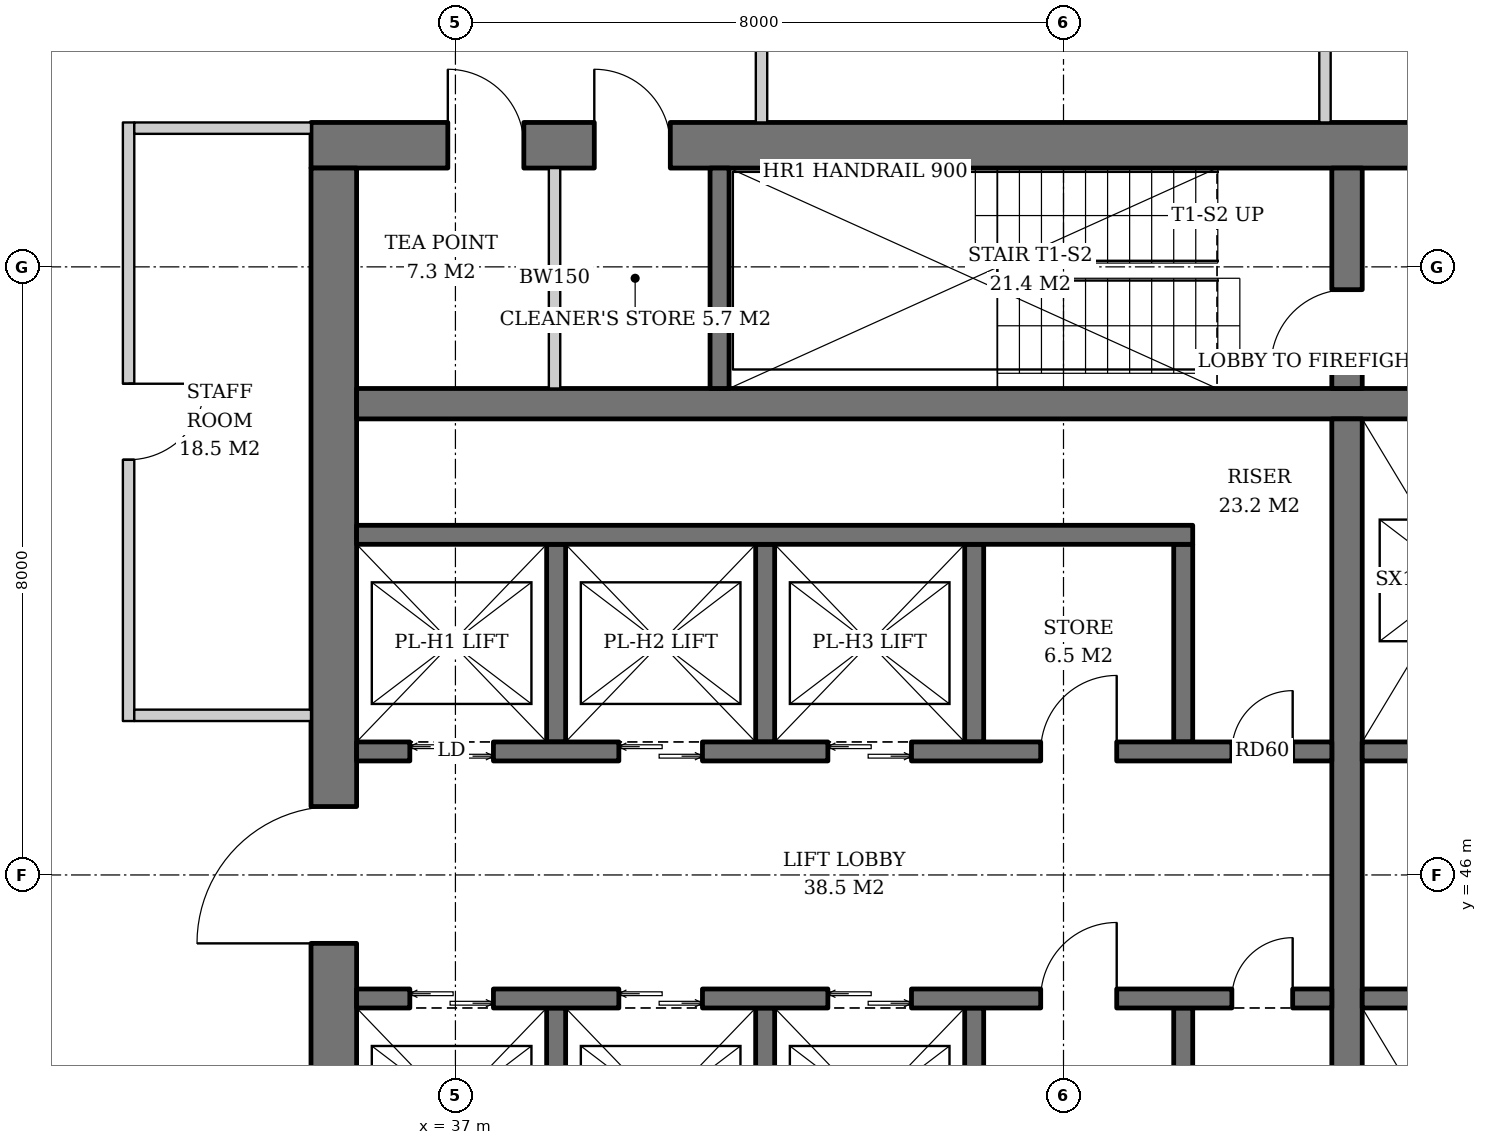
"""IFC4 building model, lengths in metres.
Left out: names, types, materials, properties, quantities, classifications, styles, units other than length and angle.
Written with IfcOpenShell. Run it as: python <this file> out.ifc"""

import sys

from ifc_helpers import new_model, si_unit, direction, frame, frame_2d, origin, place, context, subcontext, project, spatial, rectangle, extrude, element, fill, save


model = new_model("IFC4")
c1 = context("Model", 3, precision=1e-05, world=origin(), true_north=direction((0.0, 1.0)))
c2 = subcontext(c1, "Body", "Model", "MODEL_VIEW")
j1 = project(units=[si_unit("LENGTHUNIT", "METRE"), si_unit("PLANEANGLEUNIT", "RADIAN")], contexts=[c1])
p1 = place(None, origin())
s1 = spatial("IfcSite", under=j1, at=p1, CompositionType="ELEMENT")
p2 = place(p1, origin())
s2 = spatial("IfcBuilding", under=s1, at=p2, CompositionType="ELEMENT")
p3 = place(p2, frame((0.0, 0.0, 199.6)))
s3 = spatial("IfcBuildingStorey", under=s2, at=p3, CompositionType="ELEMENT", Elevation=199.6)
p4 = place(p3, frame((35.1, 55.6, 0.0), z_axis=(0.0, 0.0, 1.0), x_axis=(1.0, 0.0, 0.0)))
e1 = element("IfcWall", 1, at=p4, inside=s3, PredefinedType="SHEAR", context=c2, shape_type="SweptSolid", body=[
    extrude(rectangle(XDim=19.8, YDim=0.6, at=frame_2d((9.9, 0.0))), origin(), (0.0, 0.0, 1.0), 3.8),
])
p5 = place(p4, frame((14.54, 0.0, 0.0)))
e2 = element("IfcOpeningElement", 2, at=p5, cuts=e1, PredefinedType="OPENING", context=c2, shape_type="SweptSolid", body=[
    extrude(rectangle(XDim=1.0, YDim=2.1, at=frame_2d((0.5, 1.05))), frame((0.0, 0.31, 0.0), z_axis=(0.0, -1.0, 0.0), x_axis=(1.0, 0.0, 0.0)), (0.0, 0.0, 1.0), 0.62),
])
p6 = place(p4, frame((1.8, 0.0, 0.0)))
e3 = element("IfcOpeningElement", 3, at=p6, cuts=e1, PredefinedType="OPENING", context=c2, shape_type="SweptSolid", body=[
    extrude(rectangle(XDim=1.0, YDim=2.1, at=frame_2d((0.5, 1.05))), frame((0.0, 0.31, 0.0), z_axis=(0.0, -1.0, 0.0), x_axis=(1.0, 0.0, 0.0)), (0.0, 0.0, 1.0), 0.62),
])
p7 = place(p4, frame((3.727, 0.0, 0.0)))
e4 = element("IfcOpeningElement", 4, at=p7, cuts=e1, PredefinedType="OPENING", context=c2, shape_type="SweptSolid", body=[
    extrude(rectangle(XDim=1.0, YDim=2.1, at=frame_2d((0.5, 1.05))), frame((0.0, 0.31, 0.0), z_axis=(0.0, -1.0, 0.0), x_axis=(1.0, 0.0, 0.0)), (0.0, 0.0, 1.0), 0.62),
])
p8 = place(p3, frame((35.4, 36.7, 0.0), z_axis=(0.0, 0.0, 1.0), x_axis=(0.0, 1.0, 0.0)))
e5 = element("IfcWall", 5, at=p8, inside=s3, PredefinedType="SHEAR", context=c2, shape_type="SweptSolid", body=[
    extrude(rectangle(XDim=18.6, YDim=0.6, at=frame_2d((9.3, 0.0))), origin(), (0.0, 0.0, 1.0), 3.8),
])
p9 = place(p8, frame((8.4, 0.0, 0.0)))
e6 = element("IfcOpeningElement", 6, at=p9, cuts=e5, PredefinedType="OPENING", context=c2, shape_type="SweptSolid", body=[
    extrude(rectangle(XDim=1.8, YDim=2.4, at=frame_2d((0.9, 1.2))), frame((0.0, 0.31, 0.0), z_axis=(0.0, -1.0, 0.0), x_axis=(1.0, 0.0, 0.0)), (0.0, 0.0, 1.0), 0.62),
])
p10 = place(p3, frame((35.7, 52.2, 0.0), z_axis=(0.0, 0.0, 1.0), x_axis=(1.0, 0.0, 0.0)))
e7 = element("IfcWall", 7, at=p10, inside=s3, PredefinedType="SHEAR", context=c2, shape_type="SweptSolid", body=[
    extrude(rectangle(XDim=18.6, YDim=0.4, at=frame_2d((9.3, 0.0))), origin(), (0.0, 0.0, 1.0), 3.8),
])
p11 = place(p3, frame((48.73, 40.0, 0.0), z_axis=(0.0, 0.0, 1.0), x_axis=(0.0, 1.0, 0.0)))
e8 = element("IfcWall", 8, at=p11, inside=s3, PredefinedType="SHEAR", context=c2, shape_type="SweptSolid", body=[
    extrude(rectangle(XDim=12.0, YDim=0.4, at=frame_2d((6.0, 0.0))), origin(), (0.0, 0.0, 1.0), 3.8),
])
p12 = place(p3, frame((48.73, 52.4, 0.0), z_axis=(0.0, 0.0, 1.0), x_axis=(0.0, 1.0, 0.0)))
e9 = element("IfcWall", 9, at=p12, inside=s3, PredefinedType="SHEAR", context=c2, shape_type="SweptSolid", body=[
    extrude(rectangle(XDim=2.9, YDim=0.4, at=frame_2d((1.45, 0.0))), origin(), (0.0, 0.0, 1.0), 3.8),
])
p13 = place(p12, frame((0.3, 0.0, 0.0)))
e10 = element("IfcOpeningElement", 10, at=p13, cuts=e9, PredefinedType="OPENING", context=c2, shape_type="SweptSolid", body=[
    extrude(rectangle(XDim=1.0, YDim=2.1, at=frame_2d((0.5, 1.05))), frame((0.0, 0.21, 0.0), z_axis=(0.0, -1.0, 0.0), x_axis=(1.0, 0.0, 0.0)), (0.0, 0.0, 1.0), 0.42),
])
p14 = place(p3, frame((40.475, 52.4, 0.0), z_axis=(0.0, 0.0, 1.0), x_axis=(0.0, 1.0, 0.0)))
e11 = element("IfcWall", 11, at=p14, inside=s3, PredefinedType="SHEAR", context=c2, shape_type="SweptSolid", body=[
    extrude(rectangle(XDim=2.9, YDim=0.25, at=frame_2d((1.45, 0.0))), origin(), (0.0, 0.0, 1.0), 3.8),
])
for number, where, z_axis, x_axis in (
    (12, (38.325, 47.75, 0.0), (0.0, 0.0, 1.0), (0.0, 1.0, 0.0)),
    (13, (41.075, 47.75, 0.0), (0.0, 0.0, 1.0), (0.0, 1.0, 0.0)),
    (14, (43.825, 47.75, 0.0), (0.0, 0.0, 1.0), (0.0, 1.0, 0.0)),
    (15, (46.575, 47.75, 0.0), (0.0, 0.0, 1.0), (0.0, 1.0, 0.0)),
):
    element("IfcWall", number, at=place(p3, frame(where, z_axis=z_axis, x_axis=x_axis)), inside=s3, PredefinedType="SHEAR", context=c2, shape_type="SweptSolid", body=[
        extrude(rectangle(XDim=2.6, YDim=0.25, at=frame_2d((1.3, 0.0))), origin(), (0.0, 0.0, 1.0), 3.8),
    ])
p15 = place(p3, frame((35.7, 50.475, 0.0), z_axis=(0.0, 0.0, 1.0), x_axis=(1.0, 0.0, 0.0)))
e16 = element("IfcWall", 16, at=p15, inside=s3, PredefinedType="SHEAR", context=c2, shape_type="SweptSolid", body=[
    extrude(rectangle(XDim=11.0, YDim=0.25, at=frame_2d((5.5, 0.0))), origin(), (0.0, 0.0, 1.0), 3.8),
])
p16 = place(p3, frame((35.7, 47.625, 0.0), z_axis=(0.0, 0.0, 1.0), x_axis=(1.0, 0.0, 0.0)))
e17 = element("IfcWall", 17, at=p16, inside=s3, PredefinedType="SHEAR", context=c2, shape_type="SweptSolid", body=[
    extrude(rectangle(XDim=12.83, YDim=0.25, at=frame_2d((6.415, 0.0))), origin(), (0.0, 0.0, 1.0), 3.8),
])
p17 = place(p16, frame((0.7, 0.0, 0.0)))
e18 = element("IfcOpeningElement", 18, at=p17, cuts=e17, PredefinedType="OPENING", context=c2, shape_type="SweptSolid", body=[
    extrude(rectangle(XDim=1.1, YDim=2.2, at=frame_2d((0.55, 1.1))), frame((0.0, 0.135, 0.0), z_axis=(0.0, -1.0, 0.0), x_axis=(1.0, 0.0, 0.0)), (0.0, 0.0, 1.0), 0.27),
])
p18 = place(p16, frame((3.45, 0.0, 0.0)))
e19 = element("IfcOpeningElement", 19, at=p18, cuts=e17, PredefinedType="OPENING", context=c2, shape_type="SweptSolid", body=[
    extrude(rectangle(XDim=1.1, YDim=2.2, at=frame_2d((0.55, 1.1))), frame((0.0, 0.135, 0.0), z_axis=(0.0, -1.0, 0.0), x_axis=(1.0, 0.0, 0.0)), (0.0, 0.0, 1.0), 0.27),
])
p19 = place(p16, frame((6.2, 0.0, 0.0)))
e20 = element("IfcOpeningElement", 20, at=p19, cuts=e17, PredefinedType="OPENING", context=c2, shape_type="SweptSolid", body=[
    extrude(rectangle(XDim=1.1, YDim=2.2, at=frame_2d((0.55, 1.1))), frame((0.0, 0.135, 0.0), z_axis=(0.0, -1.0, 0.0), x_axis=(1.0, 0.0, 0.0)), (0.0, 0.0, 1.0), 0.27),
])
p20 = place(p16, frame((9.0, 0.0, 0.0)))
e21 = element("IfcOpeningElement", 21, at=p20, cuts=e17, PredefinedType="OPENING", context=c2, shape_type="SweptSolid", body=[
    extrude(rectangle(XDim=1.0, YDim=2.1, at=frame_2d((0.5, 1.05))), frame((0.0, 0.135, 0.0), z_axis=(0.0, -1.0, 0.0), x_axis=(1.0, 0.0, 0.0)), (0.0, 0.0, 1.0), 0.27),
])
p21 = place(p16, frame((11.515, 0.0, 0.0)))
e22 = element("IfcOpeningElement", 22, at=p21, cuts=e17, PredefinedType="OPENING", context=c2, shape_type="SweptSolid", body=[
    extrude(rectangle(XDim=0.8, YDim=2.0, at=frame_2d((0.4, 1.0))), frame((0.0, 0.135, 0.0), z_axis=(0.0, -1.0, 0.0), x_axis=(1.0, 0.0, 0.0)), (0.0, 0.0, 1.0), 0.27),
])
for number, where, z_axis, x_axis in (
    (23, (38.325, 44.25, 0.0), (0.0, 0.0, 1.0), (0.0, -1.0, 0.0)),
    (24, (41.075, 44.25, 0.0), (0.0, 0.0, 1.0), (0.0, -1.0, 0.0)),
    (25, (43.825, 44.25, 0.0), (0.0, 0.0, 1.0), (0.0, -1.0, 0.0)),
    (26, (46.575, 44.25, 0.0), (0.0, 0.0, 1.0), (0.0, -1.0, 0.0)),
):
    element("IfcWall", number, at=place(p3, frame(where, z_axis=z_axis, x_axis=x_axis)), inside=s3, PredefinedType="SHEAR", context=c2, shape_type="SweptSolid", body=[
        extrude(rectangle(XDim=2.6, YDim=0.25, at=frame_2d((1.3, 0.0))), origin(), (0.0, 0.0, 1.0), 3.8),
    ])
p22 = place(p3, frame((35.7, 44.375, 0.0), z_axis=(0.0, 0.0, 1.0), x_axis=(1.0, 0.0, 0.0)))
e27 = element("IfcWall", 27, at=p22, inside=s3, PredefinedType="SHEAR", context=c2, shape_type="SweptSolid", body=[
    extrude(rectangle(XDim=12.83, YDim=0.25, at=frame_2d((6.415, 0.0))), origin(), (0.0, 0.0, 1.0), 3.8),
])
p23 = place(p22, frame((0.7, 0.0, 0.0)))
e28 = element("IfcOpeningElement", 28, at=p23, cuts=e27, PredefinedType="OPENING", context=c2, shape_type="SweptSolid", body=[
    extrude(rectangle(XDim=1.1, YDim=2.2, at=frame_2d((0.55, 1.1))), frame((0.0, 0.135, 0.0), z_axis=(0.0, -1.0, 0.0), x_axis=(1.0, 0.0, 0.0)), (0.0, 0.0, 1.0), 0.27),
])
p24 = place(p22, frame((3.45, 0.0, 0.0)))
e29 = element("IfcOpeningElement", 29, at=p24, cuts=e27, PredefinedType="OPENING", context=c2, shape_type="SweptSolid", body=[
    extrude(rectangle(XDim=1.1, YDim=2.2, at=frame_2d((0.55, 1.1))), frame((0.0, 0.135, 0.0), z_axis=(0.0, -1.0, 0.0), x_axis=(1.0, 0.0, 0.0)), (0.0, 0.0, 1.0), 0.27),
])
p25 = place(p22, frame((6.2, 0.0, 0.0)))
e30 = element("IfcOpeningElement", 30, at=p25, cuts=e27, PredefinedType="OPENING", context=c2, shape_type="SweptSolid", body=[
    extrude(rectangle(XDim=1.1, YDim=2.2, at=frame_2d((0.55, 1.1))), frame((0.0, 0.135, 0.0), z_axis=(0.0, -1.0, 0.0), x_axis=(1.0, 0.0, 0.0)), (0.0, 0.0, 1.0), 0.27),
])
p26 = place(p22, frame((9.0, 0.0, 0.0)))
e31 = element("IfcOpeningElement", 31, at=p26, cuts=e27, PredefinedType="OPENING", context=c2, shape_type="SweptSolid", body=[
    extrude(rectangle(XDim=1.0, YDim=2.1, at=frame_2d((0.5, 1.05))), frame((0.0, 0.135, 0.0), z_axis=(0.0, -1.0, 0.0), x_axis=(1.0, 0.0, 0.0)), (0.0, 0.0, 1.0), 0.27),
])
p27 = place(p22, frame((11.515, 0.0, 0.0)))
e32 = element("IfcOpeningElement", 32, at=p27, cuts=e27, PredefinedType="OPENING", context=c2, shape_type="SweptSolid", body=[
    extrude(rectangle(XDim=0.8, YDim=2.0, at=frame_2d((0.4, 1.0))), frame((0.0, 0.135, 0.0), z_axis=(0.0, -1.0, 0.0), x_axis=(1.0, 0.0, 0.0)), (0.0, 0.0, 1.0), 0.27),
])
for number, where, z_axis, x_axis in (
    (33, (48.93, 47.625, 0.0), (0.0, 0.0, 1.0), (1.0, 0.0, 0.0)),
    (34, (48.93, 44.375, 0.0), (0.0, 0.0, 1.0), (1.0, 0.0, 0.0)),
):
    element("IfcWall", number, at=place(p3, frame(where, z_axis=z_axis, x_axis=x_axis)), inside=s3, PredefinedType="SHEAR", context=c2, shape_type="SweptSolid", body=[
        extrude(rectangle(XDim=5.37, YDim=0.25, at=frame_2d((2.685, 0.0))), origin(), (0.0, 0.0, 1.0), 3.8),
    ])
p28 = place(p3, frame((38.304, 52.4, 0.0), z_axis=(0.0, 0.0, 1.0), x_axis=(0.0, 1.0, 0.0)))
e35 = element("IfcWall", 35, at=p28, inside=s3, PredefinedType="SOLIDWALL", context=c2, shape_type="SweptSolid", body=[
    extrude(rectangle(XDim=2.9, YDim=0.15, at=frame_2d((1.45, 0.0))), origin(), (0.0, 0.0, 1.0), 3.62),
])
for number, where, z_axis, x_axis in (
    (36, (48.44, 55.9, 0.0), (0.0, 0.0, 1.0), (0.0, 1.0, 0.0)),
    (37, (41.027, 55.9, 0.0), (0.0, 0.0, 1.0), (0.0, 1.0, 0.0)),
):
    element("IfcWall", number, at=place(p3, frame(where, z_axis=z_axis, x_axis=x_axis)), inside=s3, PredefinedType="PARTITIONING", context=c2, shape_type="SweptSolid", body=[
        extrude(rectangle(XDim=2.325, YDim=0.15, at=frame_2d((1.163, 0.0))), origin(), (0.0, 0.0, 1.0), 3.62),
    ])
p29 = place(p3, frame((32.7, 55.9, 0.0), z_axis=(0.0, 0.0, 1.0), x_axis=(0.0, -1.0, 0.0)))
e38 = element("IfcWall", 38, at=p29, inside=s3, PredefinedType="PARTITIONING", context=c2, shape_type="SweptSolid", body=[
    extrude(rectangle(XDim=7.875, YDim=0.15, at=frame_2d((3.938, 0.0))), origin(), (0.0, 0.0, 1.0), 2.867),
])
p30 = place(p29, frame((3.438, 0.0, 0.0)))
e39 = element("IfcOpeningElement", 39, at=p30, cuts=e38, PredefinedType="OPENING", context=c2, shape_type="SweptSolid", body=[
    extrude(rectangle(XDim=1.0, YDim=2.1, at=frame_2d((0.5, 1.05))), frame((0.0, 0.085, 0.0), z_axis=(0.0, -1.0, 0.0), x_axis=(1.0, 0.0, 0.0)), (0.0, 0.0, 1.0), 0.17),
])
p31 = place(p3, frame((35.1, 55.825, 0.0), z_axis=(0.0, 0.0, 1.0), x_axis=(-1.0, 0.0, 0.0)))
e40 = element("IfcWall", 40, at=p31, inside=s3, PredefinedType="PARTITIONING", context=c2, shape_type="SweptSolid", body=[
    extrude(rectangle(XDim=2.325, YDim=0.15, at=frame_2d((1.163, 0.0))), origin(), (0.0, 0.0, 1.0), 2.867),
])
p32 = place(p3, frame((35.1, 48.1, 0.0), z_axis=(0.0, 0.0, 1.0), x_axis=(-1.0, 0.0, 0.0)))
e41 = element("IfcWall", 41, at=p32, inside=s3, PredefinedType="PARTITIONING", context=c2, shape_type="SweptSolid", body=[
    extrude(rectangle(XDim=2.325, YDim=0.15, at=frame_2d((1.163, 0.0))), origin(), (0.0, 0.0, 1.0), 3.62),
])
p33 = place(p17, origin())
e42 = element("IfcDoor", 42, at=p33, inside=s3, OperationType="DOUBLE_DOOR_SLIDING", PredefinedType="DOOR", context=c2, shape_type="SweptSolid", body=[
    extrude(rectangle(XDim=1.1, YDim=2.2, at=frame_2d((0.55, 1.1))), frame((0.0, 0.025, 0.0), z_axis=(0.0, -1.0, 0.0), x_axis=(1.0, 0.0, 0.0)), (0.0, 0.0, 1.0), 0.05),
])
fill(e18, e42)
p34 = place(p18, origin())
e43 = element("IfcDoor", 43, at=p34, inside=s3, OperationType="DOUBLE_DOOR_SLIDING", PredefinedType="DOOR", context=c2, shape_type="SweptSolid", body=[
    extrude(rectangle(XDim=1.1, YDim=2.2, at=frame_2d((0.55, 1.1))), frame((0.0, 0.025, 0.0), z_axis=(0.0, -1.0, 0.0), x_axis=(1.0, 0.0, 0.0)), (0.0, 0.0, 1.0), 0.05),
])
fill(e19, e43)
p35 = place(p19, origin())
e44 = element("IfcDoor", 44, at=p35, inside=s3, OperationType="DOUBLE_DOOR_SLIDING", PredefinedType="DOOR", context=c2, shape_type="SweptSolid", body=[
    extrude(rectangle(XDim=1.1, YDim=2.2, at=frame_2d((0.55, 1.1))), frame((0.0, 0.025, 0.0), z_axis=(0.0, -1.0, 0.0), x_axis=(1.0, 0.0, 0.0)), (0.0, 0.0, 1.0), 0.05),
])
fill(e20, e44)
p36 = place(p20, origin())
e45 = element("IfcDoor", 45, at=p36, inside=s3, OperationType="SINGLE_SWING_RIGHT", PredefinedType="DOOR", context=c2, shape_type="SweptSolid", body=[
    extrude(rectangle(XDim=1.0, YDim=2.1, at=frame_2d((0.5, 1.05))), frame((0.0, 0.025, 0.0), z_axis=(0.0, -1.0, 0.0), x_axis=(1.0, 0.0, 0.0)), (0.0, 0.0, 1.0), 0.05),
])
fill(e21, e45)
p37 = place(p21, origin())
e46 = element("IfcDoor", 46, at=p37, inside=s3, OperationType="SINGLE_SWING_RIGHT", PredefinedType="DOOR", context=c2, shape_type="SweptSolid", body=[
    extrude(rectangle(XDim=0.8, YDim=2.0, at=frame_2d((0.4, 1.0))), frame((0.0, 0.025, 0.0), z_axis=(0.0, -1.0, 0.0), x_axis=(1.0, 0.0, 0.0)), (0.0, 0.0, 1.0), 0.05),
])
fill(e22, e46)
p38 = place(p23, origin())
e47 = element("IfcDoor", 47, at=p38, inside=s3, OperationType="DOUBLE_DOOR_SLIDING", PredefinedType="DOOR", context=c2, shape_type="SweptSolid", body=[
    extrude(rectangle(XDim=1.1, YDim=2.2, at=frame_2d((0.55, 1.1))), frame((0.0, 0.025, 0.0), z_axis=(0.0, -1.0, 0.0), x_axis=(1.0, 0.0, 0.0)), (0.0, 0.0, 1.0), 0.05),
])
fill(e28, e47)
p39 = place(p24, origin())
e48 = element("IfcDoor", 48, at=p39, inside=s3, OperationType="DOUBLE_DOOR_SLIDING", PredefinedType="DOOR", context=c2, shape_type="SweptSolid", body=[
    extrude(rectangle(XDim=1.1, YDim=2.2, at=frame_2d((0.55, 1.1))), frame((0.0, 0.025, 0.0), z_axis=(0.0, -1.0, 0.0), x_axis=(1.0, 0.0, 0.0)), (0.0, 0.0, 1.0), 0.05),
])
fill(e29, e48)
p40 = place(p25, origin())
e49 = element("IfcDoor", 49, at=p40, inside=s3, OperationType="DOUBLE_DOOR_SLIDING", PredefinedType="DOOR", context=c2, shape_type="SweptSolid", body=[
    extrude(rectangle(XDim=1.1, YDim=2.2, at=frame_2d((0.55, 1.1))), frame((0.0, 0.025, 0.0), z_axis=(0.0, -1.0, 0.0), x_axis=(1.0, 0.0, 0.0)), (0.0, 0.0, 1.0), 0.05),
])
fill(e30, e49)
p41 = place(p26, origin())
e50 = element("IfcDoor", 50, at=p41, inside=s3, OperationType="SINGLE_SWING_RIGHT", PredefinedType="DOOR", context=c2, shape_type="SweptSolid", body=[
    extrude(rectangle(XDim=1.0, YDim=2.1, at=frame_2d((0.5, 1.05))), frame((0.0, 0.025, 0.0), z_axis=(0.0, -1.0, 0.0), x_axis=(1.0, 0.0, 0.0)), (0.0, 0.0, 1.0), 0.05),
])
fill(e31, e50)
p42 = place(p27, origin())
e51 = element("IfcDoor", 51, at=p42, inside=s3, OperationType="SINGLE_SWING_RIGHT", PredefinedType="DOOR", context=c2, shape_type="SweptSolid", body=[
    extrude(rectangle(XDim=0.8, YDim=2.0, at=frame_2d((0.4, 1.0))), frame((0.0, 0.025, 0.0), z_axis=(0.0, -1.0, 0.0), x_axis=(1.0, 0.0, 0.0)), (0.0, 0.0, 1.0), 0.05),
])
fill(e32, e51)
p43 = place(p13, origin())
e52 = element("IfcDoor", 52, at=p43, inside=s3, OperationType="SINGLE_SWING_LEFT", PredefinedType="DOOR", context=c2, shape_type="SweptSolid", body=[
    extrude(rectangle(XDim=1.0, YDim=2.1, at=frame_2d((0.5, 1.05))), frame((0.0, 0.025, 0.0), z_axis=(0.0, -1.0, 0.0), x_axis=(1.0, 0.0, 0.0)), (0.0, 0.0, 1.0), 0.05),
])
fill(e10, e52)
p44 = place(p9, origin())
e53 = element("IfcDoor", 53, at=p44, inside=s3, OperationType="DOUBLE_DOOR_SINGLE_SWING", PredefinedType="DOOR", context=c2, shape_type="SweptSolid", body=[
    extrude(rectangle(XDim=1.8, YDim=2.4, at=frame_2d((0.9, 1.2))), frame((0.0, 0.025, 0.0), z_axis=(0.0, -1.0, 0.0), x_axis=(1.0, 0.0, 0.0)), (0.0, 0.0, 1.0), 0.05),
])
fill(e6, e53)
p45 = place(p6, origin())
e54 = element("IfcDoor", 54, at=p45, inside=s3, OperationType="SINGLE_SWING_LEFT", PredefinedType="DOOR", context=c2, shape_type="SweptSolid", body=[
    extrude(rectangle(XDim=1.0, YDim=2.1, at=frame_2d((0.5, 1.05))), frame((0.0, -0.24, 0.0), z_axis=(0.0, -1.0, 0.0), x_axis=(1.0, 0.0, 0.0)), (0.0, 0.0, 1.0), 0.05),
])
fill(e3, e54)
p46 = place(p7, origin())
e55 = element("IfcDoor", 55, at=p46, inside=s3, OperationType="SINGLE_SWING_LEFT", PredefinedType="DOOR", context=c2, shape_type="SweptSolid", body=[
    extrude(rectangle(XDim=1.0, YDim=2.1, at=frame_2d((0.5, 1.05))), frame((0.0, -0.24, 0.0), z_axis=(0.0, -1.0, 0.0), x_axis=(1.0, 0.0, 0.0)), (0.0, 0.0, 1.0), 0.05),
])
fill(e4, e55)
p47 = place(p30, origin())
e56 = element("IfcDoor", 56, at=p47, inside=s3, OperationType="SINGLE_SWING_LEFT", PredefinedType="DOOR", context=c2, shape_type="SweptSolid", body=[
    extrude(rectangle(XDim=1.0, YDim=2.1, at=frame_2d((0.5, 1.05))), frame((0.0, 0.025, 0.0), z_axis=(0.0, -1.0, 0.0), x_axis=(1.0, 0.0, 0.0)), (0.0, 0.0, 1.0), 0.05),
])
fill(e39, e56)
save(model, sys.argv[1])
